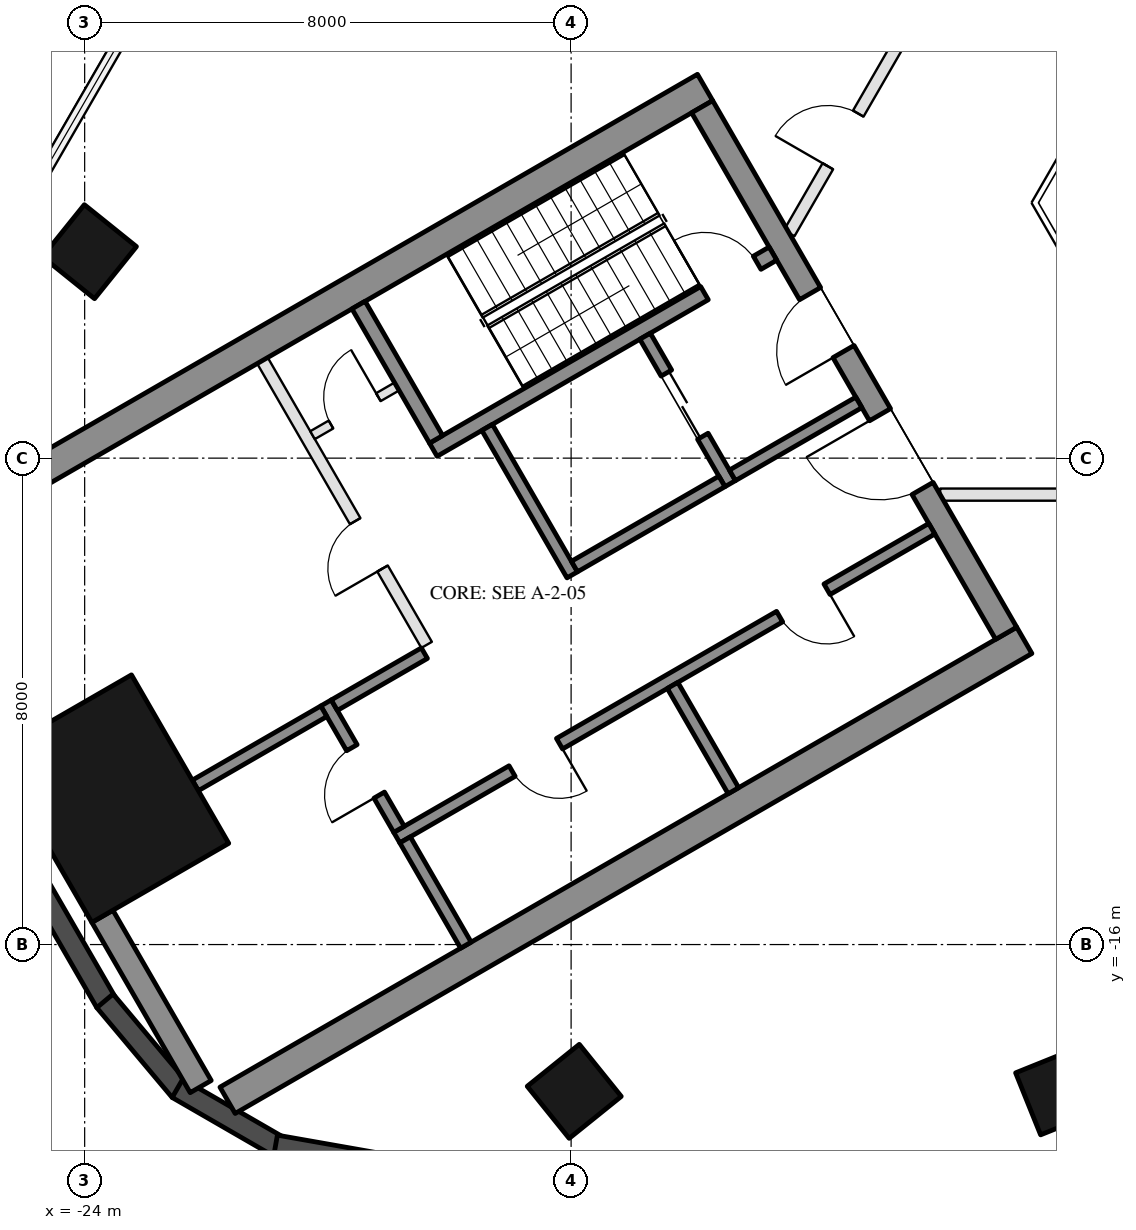
"""IFC4 building model, lengths in metres.
Left out: names, types, materials, properties, quantities, classifications, styles, units other than length and angle.
Written with IfcOpenShell. Run it as: python <this file> out.ifc"""

import sys

from ifc_helpers import new_model, si_unit, direction, frame, frame_2d, origin, origin_2d, place, context, subcontext, project, spatial, rectangle, hollow_rectangle, extrude, boolean, halfspace, element, fill, save


model = new_model("IFC4")
c1 = context("Model", 3, precision=1e-05, world=origin(), true_north=direction((0.0, 1.0)))
c2 = subcontext(c1, "Body", "Model", "MODEL_VIEW")
j1 = project(units=[si_unit("LENGTHUNIT", "METRE"), si_unit("PLANEANGLEUNIT", "RADIAN")], contexts=[c1])
p1 = place(None, origin())
s1 = spatial("IfcSite", under=j1, at=p1, CompositionType="ELEMENT")
p2 = place(p1, origin())
s2 = spatial("IfcBuilding", under=s1, at=p2, CompositionType="ELEMENT")
p3 = place(p2, frame((0.0, 0.0, 28.5)))
s3 = spatial("IfcBuildingStorey", under=s2, at=p3, CompositionType="ELEMENT", Elevation=28.5)
p4 = place(p3, frame((-15.948, -18.414, 0.0), z_axis=(0.024720370768, 0.030683618102, 0.999223407877), x_axis=(-0.99969438665, 0.000567544207, 0.024714594742)))
e1 = element("IfcColumn", 1, at=p4, inside=s3, PredefinedType="COLUMN", context=c2, shape_type="SweptSolid", body=[
    boolean("DIFFERENCE", boolean("DIFFERENCE", extrude(hollow_rectangle(XDim=1.1, YDim=1.1, WallThickness=0.05, at=origin_2d()), origin(), (0.0, 0.0, 1.0), 4.503), halfspace(frame((0.0, 0.0, 0.013), z_axis=(0.0, 0.0, 1.0), x_axis=(1.0, 0.0, 0.0)), True)), halfspace(frame((0.0, 0.0, 4.491), z_axis=(0.0, 0.0, 1.0), x_axis=(1.0, 0.0, 0.0)), False)),
])
p5 = place(p3, frame((-7.974, -18.414, 0.0), z_axis=(0.012363018834, 0.030690652017, 0.999452469927), x_axis=(-0.999923507967, 1.3568651e-05, 0.012368428817)))
e2 = element("IfcColumn", 2, at=p5, inside=s3, PredefinedType="COLUMN", context=c2, shape_type="SweptSolid", body=[
    boolean("DIFFERENCE", boolean("DIFFERENCE", extrude(hollow_rectangle(XDim=1.1, YDim=1.1, WallThickness=0.05, at=origin_2d()), origin(), (0.0, 0.0, 1.0), 4.502), halfspace(frame((0.0, 0.0, 0.011), z_axis=(0.0, 0.0, 1.0), x_axis=(1.0, 0.0, 0.0)), True)), halfspace(frame((0.0, 0.0, 4.492), z_axis=(0.0, 0.0, 1.0), x_axis=(1.0, 0.0, 0.0)), False)),
])
p6 = place(p3, frame((-23.921, -4.604, 0.0), z_axis=(0.038923767258, 0.006017462626, 0.999224064205), x_axis=(-0.500000890421, -0.865672860901, 0.024690230408)))
e3 = element("IfcColumn", 3, at=p6, inside=s3, PredefinedType="COLUMN", context=c2, shape_type="SweptSolid", body=[
    boolean("DIFFERENCE", boolean("DIFFERENCE", extrude(hollow_rectangle(XDim=1.1, YDim=1.1, WallThickness=0.05, at=origin_2d()), origin(), (0.0, 0.0, 1.0), 4.503), halfspace(frame((0.0, 0.0, 0.013), z_axis=(0.0, 0.0, 1.0), x_axis=(1.0, 0.0, 0.0)), True)), halfspace(frame((0.0, 0.0, 4.491), z_axis=(0.0, 0.0, 1.0), x_axis=(1.0, 0.0, 0.0)), False)),
])
p7 = place(p3, frame((-23.556, -13.6, 0.0), z_axis=(0.0, 0.0, 1.0), x_axis=(-0.5, 0.866025403784, 0.0)))
e4 = element("IfcColumn", 4, at=p7, inside=s3, PredefinedType="COLUMN", context=c2, shape_type="SweptSolid", body=[
    extrude(hollow_rectangle(XDim=3.2, YDim=2.6, WallThickness=0.08, at=origin_2d()), origin(), (0.0, 0.0, 1.0), 4.5),
])
p8 = place(p3, frame((-26.504, -12.005, 0.0), z_axis=(0.0, 0.0, 1.0), x_axis=(0.500014776476, -0.866016872414, 0.0)))
e5 = element("IfcWall", 5, at=p8, inside=s3, PredefinedType="SOLIDWALL", context=c2, shape_type="SweptSolid", body=[
    extrude(rectangle(XDim=5.711, YDim=0.35, at=frame_2d((2.855, 0.0))), origin(), (0.0, 0.0, 1.0), 4.2),
])
for number, where, z_axis, x_axis in (
    (6, (-23.666, -16.926, 0.0), (0.0, 0.0, 1.0), (0.643, -0.766, 0.0)),
    (7, (-22.473, -18.364, 0.0), (0.0, 0.0, 1.0), (0.866, -0.5, 0.0)),
    (8, (-20.861, -19.307, 0.0), (0.0, 0.0, 1.0), (0.985, -0.174, 0.0)),
):
    element("IfcWall", number, at=place(p3, frame(where, z_axis=z_axis, x_axis=x_axis)), inside=s3, PredefinedType="SOLIDWALL", context=c2, shape_type="SweptSolid", body=[
        extrude(rectangle(XDim=1.928, YDim=0.35, at=frame_2d((0.964, 0.0))), origin(), (0.0, 0.0, 1.0), 4.2),
    ])
for number, where, z_axis, x_axis in (
    (9, (-13.797, -1.903, 0.0), (0.0, 0.0, 1.0), (-0.866, -0.5, 0.0)),
    (10, (-8.547, -10.997, 0.0), (0.0, 0.0, 1.0), (-0.866, -0.5, 0.0)),
):
    element("IfcWall", number, at=place(p3, frame(where, z_axis=z_axis, x_axis=x_axis)), inside=s3, PredefinedType="SHEAR", context=c2, shape_type="SweptSolid", body=[
        extrude(rectangle(XDim=15.13, YDim=0.5, at=frame_2d((7.565, 0.0))), origin(), (0.0, 0.0, 1.0), 4.2),
    ])
p9 = place(p3, frame((-13.845, -2.22, 0.0), z_axis=(0.0, 0.0, 1.0), x_axis=(0.500004234368, -0.866022959057, 0.0)))
e11 = element("IfcWall", 11, at=p9, inside=s3, PredefinedType="SHEAR", context=c2, shape_type="SweptSolid", body=[
    extrude(rectangle(XDim=10.0, YDim=0.4, at=frame_2d((5.0, 0.0))), origin(), (0.0, 0.0, 1.0), 4.2),
])
p10 = place(p9, frame((3.55, 0.0, 0.0)))
e12 = element("IfcOpeningElement", 12, at=p10, cuts=e11, PredefinedType="OPENING", context=c2, shape_type="SweptSolid", body=[
    extrude(rectangle(XDim=1.1, YDim=2.1, at=frame_2d((0.55, 1.05))), frame((0.0, 0.21, 0.0), z_axis=(0.0, -1.0, 0.0), x_axis=(1.0, 0.0, 0.0)), (0.0, 0.0, 1.0), 0.42),
])
p11 = place(p9, frame((5.85, 0.0, 0.0)))
e13 = element("IfcOpeningElement", 13, at=p11, cuts=e11, PredefinedType="OPENING", context=c2, shape_type="SweptSolid", body=[
    extrude(rectangle(XDim=1.4, YDim=2.1, at=frame_2d((0.7, 1.05))), frame((0.0, 0.21, 0.0), z_axis=(0.0, -1.0, 0.0), x_axis=(1.0, 0.0, 0.0)), (0.0, 0.0, 1.0), 0.42),
])
p12 = place(p3, frame((-23.708, -15.536, 0.0), z_axis=(0.0, 0.0, 1.0), x_axis=(0.500012177251, -0.866018373131, 0.0)))
e14 = element("IfcWall", 14, at=p12, inside=s3, PredefinedType="SHEAR", context=c2, shape_type="SweptSolid", body=[
    extrude(rectangle(XDim=3.234, YDim=0.4, at=frame_2d((1.617, 0.0))), origin(), (0.0, 0.0, 1.0), 4.2),
])
p13 = place(p3, frame((-12.681, -4.636, 0.0), z_axis=(0.0, 0.0, 1.0), x_axis=(-0.866021702275, -0.500006411147, 0.0)))
e15 = element("IfcWall", 15, at=p13, inside=s3, PredefinedType="SHEAR", context=c2, shape_type="SweptSolid", body=[
    extrude(rectangle(XDim=6.45, YDim=0.25, at=frame_2d((3.225, 0.0))), origin(), (0.0, 0.0, 1.0), 4.2),
])
p14 = place(p13, frame((0.3, 0.0, 0.0)))
e16 = element("IfcOpeningElement", 16, at=p14, cuts=e15, PredefinedType="OPENING", context=c2, shape_type="SweptSolid", body=[
    extrude(rectangle(XDim=1.0, YDim=2.1, at=frame_2d((0.5, 1.05))), frame((0.0, 0.135, 0.0), z_axis=(0.0, -1.0, 0.0), x_axis=(1.0, 0.0, 0.0)), (0.0, 0.0, 1.0), 0.27),
])
p15 = place(p3, frame((-19.496, -5.482, 0.0), z_axis=(0.0, 0.0, 1.0), x_axis=(0.499990435942, -0.866030925526, 0.0)))
e17 = element("IfcWall", 17, at=p15, inside=s3, PredefinedType="SHEAR", context=c2, shape_type="SweptSolid", body=[
    extrude(rectangle(XDim=2.55, YDim=0.25, at=frame_2d((1.275, 0.0))), origin(), (0.0, 0.0, 1.0), 4.2),
])
p16 = place(p3, frame((-17.381, -7.495, 0.0), z_axis=(0.0, 0.0, 1.0), x_axis=(0.500011755427, -0.866018616679, 0.0)))
e18 = element("IfcWall", 18, at=p16, inside=s3, PredefinedType="SHEAR", context=c2, shape_type="SweptSolid", body=[
    extrude(rectangle(XDim=2.8, YDim=0.2, at=frame_2d((1.4, 0.0))), origin(), (0.0, 0.0, 1.0), 4.2),
])
p17 = place(p3, frame((-14.783, -5.995, 0.0), z_axis=(0.0, 0.0, 1.0), x_axis=(0.49994636267, -0.866056369097, 0.0)))
e19 = element("IfcWall", 19, at=p17, inside=s3, PredefinedType="SHEAR", context=c2, shape_type="SweptSolid", body=[
    extrude(rectangle(XDim=2.8, YDim=0.2, at=frame_2d((1.4, 0.0))), origin(), (0.0, 0.0, 1.0), 4.2),
])
p18 = place(p17, frame((0.7, 0.0, 0.0)))
e20 = element("IfcOpeningElement", 20, at=p18, cuts=e19, PredefinedType="OPENING", context=c2, shape_type="SweptSolid", body=[
    extrude(rectangle(XDim=1.2, YDim=2.1, at=frame_2d((0.6, 1.05))), frame((0.0, 0.11, 0.0), z_axis=(0.0, -1.0, 0.0), x_axis=(1.0, 0.0, 0.0)), (0.0, 0.0, 1.0), 0.22),
])
p19 = place(p3, frame((-13.52, -8.383, 0.0), z_axis=(0.0, 0.0, 1.0), x_axis=(-0.866034573852, -0.49998411664, 0.0)))
e21 = element("IfcWall", 21, at=p19, inside=s3, PredefinedType="SHEAR", context=c2, shape_type="SweptSolid", body=[
    extrude(rectangle(XDim=2.8, YDim=0.2, at=frame_2d((1.4, 0.0))), origin(), (0.0, 0.0, 1.0), 4.2),
])
p20 = place(p3, frame((-11.268, -7.083, 0.0), z_axis=(0.0, 0.0, 1.0), x_axis=(-0.866050077142, -0.499957262057, 0.0)))
e22 = element("IfcWall", 22, at=p20, inside=s3, PredefinedType="SHEAR", context=c2, shape_type="SweptSolid", body=[
    extrude(rectangle(XDim=2.4, YDim=0.2, at=frame_2d((1.2, 0.0))), origin(), (0.0, 0.0, 1.0), 4.2),
])
p21 = place(p3, frame((-10.068, -9.162, 0.0), z_axis=(0.0, 0.0, 1.0), x_axis=(-0.866032725843, -0.499987317609, 0.0)))
e23 = element("IfcWall", 23, at=p21, inside=s3, PredefinedType="SHEAR", context=c2, shape_type="SweptSolid", body=[
    extrude(rectangle(XDim=10.16, YDim=0.2, at=frame_2d((5.08, 0.0))), origin(), (0.0, 0.0, 1.0), 4.2),
])
p22 = place(p21, frame((1.99, 0.0, 0.0)))
e24 = element("IfcOpeningElement", 24, at=p22, cuts=e23, PredefinedType="OPENING", context=c2, shape_type="SweptSolid", body=[
    extrude(rectangle(XDim=0.9, YDim=2.1, at=frame_2d((0.45, 1.05))), frame((0.0, 0.11, 0.0), z_axis=(0.0, -1.0, 0.0), x_axis=(1.0, 0.0, 0.0)), (0.0, 0.0, 1.0), 0.22),
])
p23 = place(p21, frame((7.07, 0.0, 0.0)))
e25 = element("IfcOpeningElement", 25, at=p23, cuts=e23, PredefinedType="OPENING", context=c2, shape_type="SweptSolid", body=[
    extrude(rectangle(XDim=0.9, YDim=2.1, at=frame_2d((0.45, 1.05))), frame((0.0, 0.11, 0.0), z_axis=(0.0, -1.0, 0.0), x_axis=(1.0, 0.0, 0.0)), (0.0, 0.0, 1.0), 0.22),
])
p24 = place(p3, frame((-20.031, -12.026, 0.0), z_axis=(0.0, 0.0, 1.0), x_axis=(0.500033551112, -0.866006032174, 0.0)))
e26 = element("IfcWall", 26, at=p24, inside=s3, PredefinedType="SHEAR", context=c2, shape_type="SweptSolid", body=[
    extrude(rectangle(XDim=2.4, YDim=0.2, at=frame_2d((1.2, 0.0))), origin(), (0.0, 0.0, 1.0), 4.2),
])
p25 = place(p24, frame((0.85, 0.0, 0.0)))
e27 = element("IfcOpeningElement", 27, at=p25, cuts=e26, PredefinedType="OPENING", context=c2, shape_type="SweptSolid", body=[
    extrude(rectangle(XDim=0.9, YDim=2.1, at=frame_2d((0.45, 1.05))), frame((0.0, 0.11, 0.0), z_axis=(0.0, -1.0, 0.0), x_axis=(1.0, 0.0, 0.0)), (0.0, 0.0, 1.0), 0.22),
])
p26 = place(p3, frame((-18.413, -11.208, 0.0), z_axis=(0.0, 0.0, 1.0), x_axis=(-0.866038183914, -0.499977863513, 0.0)))
e28 = element("IfcWall", 28, at=p26, inside=s3, PredefinedType="SHEAR", context=c2, shape_type="SweptSolid", body=[
    extrude(rectangle(XDim=1.71, YDim=0.2, at=frame_2d((0.855, 0.0))), origin(), (0.0, 0.0, 1.0), 4.2),
])
for number, where, z_axis, x_axis in (
    (29, (-14.331, -11.738, 0.0), (0.0, 0.0, 1.0), (0.5, -0.866, 0.0)),
    (30, (-18.73, -14.278, 0.0), (0.0, 0.0, 1.0), (0.5, -0.866, 0.0)),
):
    element("IfcWall", number, at=place(p3, frame(where, z_axis=z_axis, x_axis=x_axis)), inside=s3, PredefinedType="SHEAR", context=c2, shape_type="SweptSolid", body=[
        extrude(rectangle(XDim=2.0, YDim=0.2, at=frame_2d((1.0, 0.0))), origin(), (0.0, 0.0, 1.0), 4.2),
    ])
p27 = place(p3, frame((-20.067, -12.163, 0.0), z_axis=(0.0, 0.0, 1.0), x_axis=(-0.866048967903, -0.499959183527, 0.0)))
e31 = element("IfcWall", 31, at=p27, inside=s3, PredefinedType="SHEAR", context=c2, shape_type="SweptSolid", body=[
    extrude(rectangle(XDim=2.44, YDim=0.2, at=frame_2d((1.22, 0.0))), origin(), (0.0, 0.0, 1.0), 4.2),
])
p28 = place(p3, frame((-21.076, -6.395, 0.0), z_axis=(0.0, 0.0, 1.0), x_axis=(0.50001468107, -0.866016927499, 0.0)))
e32 = element("IfcWall", 32, at=p28, inside=s3, PredefinedType="PARTITIONING", context=c2, shape_type="SweptSolid", body=[
    extrude(rectangle(XDim=5.4, YDim=0.2, at=frame_2d((2.7, 0.0))), origin(), (0.0, 0.0, 1.0), 4.2),
])
p29 = place(p28, frame((3.05, 0.0, 0.0)))
e33 = element("IfcOpeningElement", 33, at=p29, cuts=e32, PredefinedType="OPENING", context=c2, shape_type="SweptSolid", body=[
    extrude(rectangle(XDim=0.9, YDim=2.1, at=frame_2d((0.45, 1.05))), frame((0.0, 0.11, 0.0), z_axis=(0.0, -1.0, 0.0), x_axis=(1.0, 0.0, 0.0)), (0.0, 0.0, 1.0), 0.22),
])
p30 = place(p3, frame((-18.866, -6.822, 0.0), z_axis=(0.0, 0.0, 1.0), x_axis=(-0.866028054938, -0.499995408039, 0.0)))
e34 = element("IfcWall", 34, at=p30, inside=s3, PredefinedType="PARTITIONING", context=c2, shape_type="SweptSolid", body=[
    extrude(rectangle(XDim=1.6, YDim=0.15, at=frame_2d((0.8, 0.0))), origin(), (0.0, 0.0, 1.0), 4.2),
])
p31 = place(p30, frame((0.35, 0.0, 0.0)))
e35 = element("IfcOpeningElement", 35, at=p31, cuts=e34, PredefinedType="OPENING", context=c2, shape_type="SweptSolid", body=[
    extrude(rectangle(XDim=0.9, YDim=2.1, at=frame_2d((0.45, 1.05))), frame((0.0, 0.085, 0.0), z_axis=(0.0, -1.0, 0.0), x_axis=(1.0, 0.0, 0.0)), (0.0, 0.0, 1.0), 0.17),
])
p32 = place(p3, frame((-9.93, -8.6, 0.0), z_axis=(0.0, 0.0, 1.0), x_axis=(1.0, 0.0, 0.0)))
e36 = element("IfcWall", 36, at=p32, inside=s3, PredefinedType="PARTITIONING", context=c2, shape_type="SweptSolid", body=[
    extrude(rectangle(XDim=19.861, YDim=0.2, at=frame_2d((9.93, 0.0))), origin(), (0.0, 0.0, 1.0), 3.41),
])
p33 = place(p32, frame((2.592, 0.0, 0.0)))
e37 = element("IfcOpeningElement", 37, at=p33, cuts=e36, PredefinedType="OPENING", context=c2, shape_type="SweptSolid", body=[
    extrude(rectangle(XDim=1.8, YDim=2.4, at=frame_2d((0.9, 1.2))), frame((0.0, 0.11, 0.0), z_axis=(0.0, -1.0, 0.0), x_axis=(1.0, 0.0, 0.0)), (0.0, 0.0, 1.0), 0.22),
])
p34 = place(p32, frame((9.575, 0.0, 0.0)))
e38 = element("IfcOpeningElement", 38, at=p34, cuts=e36, PredefinedType="OPENING", context=c2, shape_type="SweptSolid", body=[
    extrude(rectangle(XDim=1.8, YDim=2.4, at=frame_2d((0.9, 1.2))), frame((0.0, 0.11, 0.0), z_axis=(0.0, -1.0, 0.0), x_axis=(1.0, 0.0, 0.0)), (0.0, 0.0, 1.0), 0.22),
])
p35 = place(p32, frame((16.377, 0.0, 0.0)))
e39 = element("IfcOpeningElement", 39, at=p35, cuts=e36, PredefinedType="OPENING", context=c2, shape_type="SweptSolid", body=[
    extrude(rectangle(XDim=1.0, YDim=2.1, at=frame_2d((0.5, 1.05))), frame((0.0, 0.11, 0.0), z_axis=(0.0, -1.0, 0.0), x_axis=(1.0, 0.0, 0.0)), (0.0, 0.0, 1.0), 0.22),
])
p36 = place(p3, frame((-2.482, 12.9, 0.0), z_axis=(0.0, 0.0, 1.0), x_axis=(-0.50000478328, -0.866022642139, 0.0)))
e40 = element("IfcWall", 40, at=p36, inside=s3, PredefinedType="PARTITIONING", context=c2, shape_type="SweptSolid", body=[
    extrude(rectangle(XDim=19.861, YDim=0.2, at=frame_2d((9.931, 0.0))), origin(), (0.0, 0.0, 1.0), 3.41),
])
p37 = place(p36, frame((13.23, 0.0, 0.0)))
e41 = element("IfcOpeningElement", 41, at=p37, cuts=e40, PredefinedType="OPENING", context=c2, shape_type="SweptSolid", body=[
    extrude(rectangle(XDim=1.8, YDim=2.1, at=frame_2d((0.9, 1.05))), frame((0.0, 0.11, 0.0), z_axis=(0.0, -1.0, 0.0), x_axis=(1.0, 0.0, 0.0)), (0.0, 0.0, 1.0), 0.22),
])
p38 = place(p36, frame((1.634, 0.0, 0.0)))
e42 = element("IfcOpeningElement", 42, at=p38, cuts=e40, PredefinedType="OPENING", context=c2, shape_type="SweptSolid", body=[
    extrude(rectangle(XDim=1.2, YDim=2.1, at=frame_2d((0.6, 1.05))), frame((0.0, 0.11, 0.0), z_axis=(0.0, -1.0, 0.0), x_axis=(1.0, 0.0, 0.0)), (0.0, 0.0, 1.0), 0.22),
])
p39 = place(p36, frame((6.206, 0.0, 0.0)))
e43 = element("IfcOpeningElement", 43, at=p39, cuts=e40, PredefinedType="OPENING", context=c2, shape_type="SweptSolid", body=[
    extrude(rectangle(XDim=1.0, YDim=2.1, at=frame_2d((0.5, 1.05))), frame((0.0, 0.11, 0.0), z_axis=(0.0, -1.0, 0.0), x_axis=(1.0, 0.0, 0.0)), (0.0, 0.0, 1.0), 0.22),
])
p40 = place(p36, frame((9.943, 0.0, 0.0)))
e44 = element("IfcOpeningElement", 44, at=p40, cuts=e40, PredefinedType="OPENING", context=c2, shape_type="SweptSolid", body=[
    extrude(rectangle(XDim=1.0, YDim=2.1, at=frame_2d((0.5, 1.05))), frame((0.0, 0.11, 0.0), z_axis=(0.0, -1.0, 0.0), x_axis=(1.0, 0.0, 0.0)), (0.0, 0.0, 1.0), 0.22),
])
p41 = place(p36, frame((17.59, 0.0, 0.0)))
e45 = element("IfcOpeningElement", 45, at=p41, cuts=e40, PredefinedType="OPENING", context=c2, shape_type="SweptSolid", body=[
    extrude(rectangle(XDim=1.0, YDim=2.1, at=frame_2d((0.5, 1.05))), frame((0.0, 0.11, 0.0), z_axis=(0.0, -1.0, 0.0), x_axis=(1.0, 0.0, 0.0)), (0.0, 0.0, 1.0), 0.22),
])
p42 = place(p18, origin())
e46 = element("IfcDoor", 46, at=p42, inside=s3, OperationType="DOUBLE_DOOR_SLIDING", PredefinedType="DOOR", context=c2, shape_type="SweptSolid", body=[
    extrude(rectangle(XDim=1.2, YDim=2.1, at=frame_2d((0.6, 1.05))), frame((0.0, 0.025, 0.0), z_axis=(0.0, -1.0, 0.0), x_axis=(1.0, 0.0, 0.0)), (0.0, 0.0, 1.0), 0.05),
])
fill(e20, e46)
p43 = place(p31, frame((0.9, 0.0, 0.0), z_axis=(0.0, 0.0, 1.0), x_axis=(-1.0, 0.0, 0.0)))
e47 = element("IfcDoor", 47, at=p43, inside=s3, OperationType="SINGLE_SWING_RIGHT", PredefinedType="DOOR", context=c2, shape_type="SweptSolid", body=[
    extrude(rectangle(XDim=0.9, YDim=2.1, at=frame_2d((0.45, 1.05))), frame((0.0, 0.025, 0.0), z_axis=(0.0, -1.0, 0.0), x_axis=(1.0, 0.0, 0.0)), (0.0, 0.0, 1.0), 0.05),
])
fill(e35, e47)
p44 = place(p22, origin())
e48 = element("IfcDoor", 48, at=p44, inside=s3, OperationType="SINGLE_SWING_LEFT", PredefinedType="DOOR", context=c2, shape_type="SweptSolid", body=[
    extrude(rectangle(XDim=0.9, YDim=2.1, at=frame_2d((0.45, 1.05))), frame((0.0, 0.025, 0.0), z_axis=(0.0, -1.0, 0.0), x_axis=(1.0, 0.0, 0.0)), (0.0, 0.0, 1.0), 0.05),
])
fill(e24, e48)
p45 = place(p23, origin())
e49 = element("IfcDoor", 49, at=p45, inside=s3, OperationType="SINGLE_SWING_LEFT", PredefinedType="DOOR", context=c2, shape_type="SweptSolid", body=[
    extrude(rectangle(XDim=0.9, YDim=2.1, at=frame_2d((0.45, 1.05))), frame((0.0, 0.025, 0.0), z_axis=(0.0, -1.0, 0.0), x_axis=(1.0, 0.0, 0.0)), (0.0, 0.0, 1.0), 0.05),
])
fill(e25, e49)
p46 = place(p25, frame((0.9, 0.0, 0.0), z_axis=(0.0, 0.0, 1.0), x_axis=(-1.0, 0.0, 0.0)))
e50 = element("IfcDoor", 50, at=p46, inside=s3, OperationType="SINGLE_SWING_LEFT", PredefinedType="DOOR", context=c2, shape_type="SweptSolid", body=[
    extrude(rectangle(XDim=0.9, YDim=2.1, at=frame_2d((0.45, 1.05))), frame((0.0, 0.025, 0.0), z_axis=(0.0, -1.0, 0.0), x_axis=(1.0, 0.0, 0.0)), (0.0, 0.0, 1.0), 0.05),
])
fill(e27, e50)
p47 = place(p29, frame((0.9, 0.0, 0.0), z_axis=(0.0, 0.0, 1.0), x_axis=(-1.0, 0.0, 0.0)))
e51 = element("IfcDoor", 51, at=p47, inside=s3, OperationType="SINGLE_SWING_LEFT", PredefinedType="DOOR", context=c2, shape_type="SweptSolid", body=[
    extrude(rectangle(XDim=0.9, YDim=2.1, at=frame_2d((0.45, 1.05))), frame((0.0, 0.025, 0.0), z_axis=(0.0, -1.0, 0.0), x_axis=(1.0, 0.0, 0.0)), (0.0, 0.0, 1.0), 0.05),
])
fill(e33, e51)
p48 = place(p10, frame((1.1, 0.0, 0.0), z_axis=(0.0, 0.0, 1.0), x_axis=(-1.0, 0.0, 0.0)))
e52 = element("IfcDoor", 52, at=p48, inside=s3, OperationType="SINGLE_SWING_LEFT", PredefinedType="DOOR", context=c2, shape_type="SweptSolid", body=[
    extrude(rectangle(XDim=1.1, YDim=2.1, at=frame_2d((0.55, 1.05))), frame((0.0, 0.025, 0.0), z_axis=(0.0, -1.0, 0.0), x_axis=(1.0, 0.0, 0.0)), (0.0, 0.0, 1.0), 0.05),
])
fill(e12, e52)
p49 = place(p11, frame((1.4, 0.0, 0.0), z_axis=(0.0, 0.0, 1.0), x_axis=(-1.0, 0.0, 0.0)))
e53 = element("IfcDoor", 53, at=p49, inside=s3, OperationType="DOUBLE_DOOR_SINGLE_SWING", PredefinedType="DOOR", context=c2, shape_type="SweptSolid", body=[
    extrude(rectangle(XDim=1.4, YDim=2.1, at=frame_2d((0.7, 1.05))), frame((0.0, 0.025, 0.0), z_axis=(0.0, -1.0, 0.0), x_axis=(1.0, 0.0, 0.0)), (0.0, 0.0, 1.0), 0.05),
])
fill(e13, e53)
p50 = place(p14, frame((1.0, 0.0, 0.0), z_axis=(0.0, 0.0, 1.0), x_axis=(-1.0, 0.0, 0.0)))
e54 = element("IfcDoor", 54, at=p50, inside=s3, OperationType="SINGLE_SWING_LEFT", PredefinedType="DOOR", context=c2, shape_type="SweptSolid", body=[
    extrude(rectangle(XDim=1.0, YDim=2.1, at=frame_2d((0.5, 1.05))), frame((0.0, 0.025, 0.0), z_axis=(0.0, -1.0, 0.0), x_axis=(1.0, 0.0, 0.0)), (0.0, 0.0, 1.0), 0.05),
])
fill(e16, e54)
p51 = place(p41, frame((1.0, 0.0, 0.0), z_axis=(0.0, 0.0, 1.0), x_axis=(-1.0, 0.0, 0.0)))
e55 = element("IfcDoor", 55, at=p51, inside=s3, OperationType="SINGLE_SWING_LEFT", PredefinedType="DOOR", context=c2, shape_type="SweptSolid", body=[
    extrude(rectangle(XDim=1.0, YDim=2.1, at=frame_2d((0.5, 1.05))), frame((0.0, 0.025, 0.0), z_axis=(0.0, -1.0, 0.0), x_axis=(1.0, 0.0, 0.0)), (0.0, 0.0, 1.0), 0.05),
])
fill(e45, e55)
save(model, sys.argv[1])
